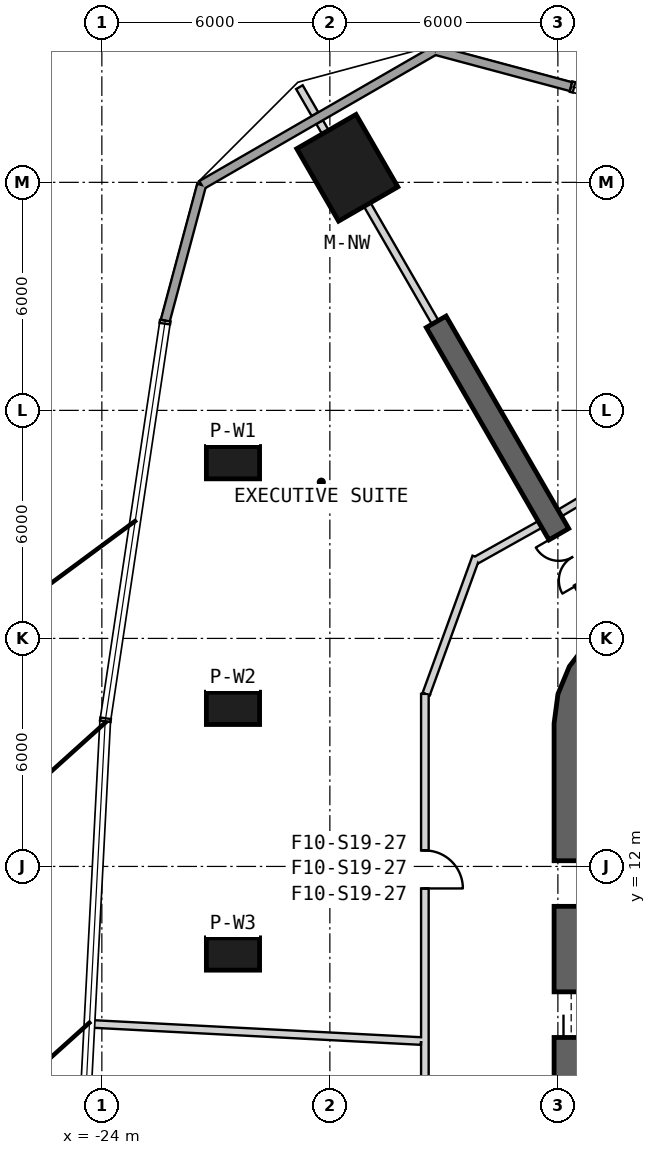
"""IFC4 building model, lengths in metres.
Left out: names, types, materials, properties, quantities, classifications, styles, units other than length and angle.
Written with IfcOpenShell. Run it as: python <this file> out.ifc"""

import sys

from ifc_helpers import new_model, si_unit, direction, frame, frame_2d, origin, origin_2d, place, context, subcontext, project, spatial, polyline, rectangle, outline, extrude, element, fill, save


model = new_model("IFC4")
c1 = context("Model", 3, precision=1e-05, world=origin(), true_north=direction((0.0, 1.0)))
c2 = subcontext(c1, "Body", "Model", "MODEL_VIEW")
j1 = project(units=[si_unit("LENGTHUNIT", "METRE"), si_unit("PLANEANGLEUNIT", "RADIAN")], contexts=[c1])
p1 = place(None, origin())
s1 = spatial("IfcSite", under=j1, at=p1, CompositionType="ELEMENT")
p2 = place(p1, origin())
s2 = spatial("IfcBuilding", under=s1, at=p2, CompositionType="ELEMENT")
p3 = place(p2, frame((0.0, 0.0, 310.4)))
s3 = spatial("IfcBuildingStorey", under=s2, at=p3, CompositionType="ELEMENT", Elevation=310.4)
p4 = place(p3, frame((-17.542, 30.383, 0.0), z_axis=(0.0, 0.0, 1.0), x_axis=(-0.5, 0.866025403784, 0.0)))
e1 = element("IfcColumn", 1, at=p4, inside=s3, PredefinedType="COLUMN", context=c2, shape_type="SweptSolid", body=[
    extrude(rectangle(XDim=2.2, YDim=1.8, at=origin_2d()), origin(), (0.0, 0.0, 1.0), 3.9),
])
for number, where, z_axis, x_axis in (
    (2, (-20.55, 22.624, 0.0), (0.0, 0.0, 1.0), (-1.0, 0.0, 0.0)),
    (3, (-20.55, 16.16, 0.0), (0.0, 0.0, 1.0), (-1.0, 0.0, 0.0)),
    (4, (-20.55, 9.696, 0.0), (0.0, 0.0, 1.0), (-1.0, 0.0, 0.0)),
):
    element("IfcColumn", number, at=place(p3, frame(where, z_axis=z_axis, x_axis=x_axis)), inside=s3, PredefinedType="COLUMN", context=c2, shape_type="SweptSolid", body=[
        extrude(rectangle(XDim=1.4, YDim=0.85, at=origin_2d()), origin(), (0.0, 0.0, 1.0), 3.9),
    ])
p5 = place(p3, frame((-11.65, 15.762, 0.0), z_axis=(0.0, 0.0, 1.0), x_axis=(0.0, -1.0, 0.0)))
e5 = element("IfcWall", 5, at=p5, inside=s3, PredefinedType="SHEAR", context=c2, shape_type="SweptSolid", body=[
    extrude(rectangle(XDim=31.523, YDim=0.9, at=frame_2d((15.762, 0.0))), origin(), (0.0, 0.0, 1.0), 3.9),
])
p6 = place(p5, frame((7.062, 0.0, 0.0)))
e6 = element("IfcOpeningElement", 6, at=p6, cuts=e5, PredefinedType="OPENING", context=c2, shape_type="SweptSolid", body=[
    extrude(rectangle(XDim=1.2, YDim=2.4, at=frame_2d((0.6, 1.2))), frame((0.0, 0.46, 0.0), z_axis=(0.0, -1.0, 0.0), x_axis=(1.0, 0.0, 0.0)), (0.0, 0.0, 1.0), 0.92),
])
p7 = place(p5, frame((9.762, 0.0, 0.0)))
e7 = element("IfcOpeningElement", 7, at=p7, cuts=e5, PredefinedType="OPENING", context=c2, shape_type="SweptSolid", body=[
    extrude(rectangle(XDim=1.2, YDim=2.4, at=frame_2d((0.6, 1.2))), frame((0.0, 0.46, 0.0), z_axis=(0.0, -1.0, 0.0), x_axis=(1.0, 0.0, 0.0)), (0.0, 0.0, 1.0), 0.92),
])
p8 = place(p5, frame((12.462, 0.0, 0.0)))
e8 = element("IfcOpeningElement", 8, at=p8, cuts=e5, PredefinedType="OPENING", context=c2, shape_type="SweptSolid", body=[
    extrude(rectangle(XDim=1.2, YDim=2.4, at=frame_2d((0.6, 1.2))), frame((0.0, 0.46, 0.0), z_axis=(0.0, -1.0, 0.0), x_axis=(1.0, 0.0, 0.0)), (0.0, 0.0, 1.0), 0.92),
])
p9 = place(p5, frame((15.162, 0.0, 0.0)))
e9 = element("IfcOpeningElement", 9, at=p9, cuts=e5, PredefinedType="OPENING", context=c2, shape_type="SweptSolid", body=[
    extrude(rectangle(XDim=1.2, YDim=2.4, at=frame_2d((0.6, 1.2))), frame((0.0, 0.46, 0.0), z_axis=(0.0, -1.0, 0.0), x_axis=(1.0, 0.0, 0.0)), (0.0, 0.0, 1.0), 0.92),
])
p10 = place(p5, frame((17.862, 0.0, 0.0)))
e10 = element("IfcOpeningElement", 10, at=p10, cuts=e5, PredefinedType="OPENING", context=c2, shape_type="SweptSolid", body=[
    extrude(rectangle(XDim=1.2, YDim=2.4, at=frame_2d((0.6, 1.2))), frame((0.0, 0.46, 0.0), z_axis=(0.0, -1.0, 0.0), x_axis=(1.0, 0.0, 0.0)), (0.0, 0.0, 1.0), 0.92),
])
p11 = place(p5, frame((20.562, 0.0, 0.0)))
e11 = element("IfcOpeningElement", 11, at=p11, cuts=e5, PredefinedType="OPENING", context=c2, shape_type="SweptSolid", body=[
    extrude(rectangle(XDim=1.2, YDim=2.4, at=frame_2d((0.6, 1.2))), frame((0.0, 0.46, 0.0), z_axis=(0.0, -1.0, 0.0), x_axis=(1.0, 0.0, 0.0)), (0.0, 0.0, 1.0), 0.92),
])
p12 = place(p5, frame((23.262, 0.0, 0.0)))
e12 = element("IfcOpeningElement", 12, at=p12, cuts=e5, PredefinedType="OPENING", context=c2, shape_type="SweptSolid", body=[
    extrude(rectangle(XDim=1.2, YDim=2.4, at=frame_2d((0.6, 1.2))), frame((0.0, 0.46, 0.0), z_axis=(0.0, -1.0, 0.0), x_axis=(1.0, 0.0, 0.0)), (0.0, 0.0, 1.0), 0.92),
])
p13 = place(p5, frame((3.612, 0.0, 0.0)))
e13 = element("IfcOpeningElement", 13, at=p13, cuts=e5, PredefinedType="OPENING", context=c2, shape_type="SweptSolid", body=[
    extrude(rectangle(XDim=1.2, YDim=2.4, at=frame_2d((0.6, 1.2))), frame((0.0, 0.46, 0.0), z_axis=(0.0, -1.0, 0.0), x_axis=(1.0, 0.0, 0.0)), (0.0, 0.0, 1.0), 0.92),
])
p14 = place(p5, frame((26.712, 0.0, 0.0)))
e14 = element("IfcOpeningElement", 14, at=p14, cuts=e5, PredefinedType="OPENING", context=c2, shape_type="SweptSolid", body=[
    extrude(rectangle(XDim=1.2, YDim=2.4, at=frame_2d((0.6, 1.2))), frame((0.0, 0.46, 0.0), z_axis=(0.0, -1.0, 0.0), x_axis=(1.0, 0.0, 0.0)), (0.0, 0.0, 1.0), 0.92),
])
p15 = place(p3, origin())
e15 = element("IfcWall", 15, at=p15, inside=s3, PredefinedType="SHEAR", context=c2, shape_type="SweptSolid", body=[
    extrude(outline(polyline([(-7.6, 18.36), (-8.323, 18.659), (-9.1, 18.762), (-9.876, 18.659), (-10.6, 18.36), (-11.221, 17.883), (-11.698, 17.262), (-11.998, 16.538), (-12.1, 15.762), (-11.2, 15.762), (-11.128, 16.305), (-10.919, 16.812), (-10.585, 17.247), (-10.15, 17.58), (-9.644, 17.79), (-9.1, 17.862), (-8.556, 17.79), (-8.05, 17.58), (-7.6, 18.36)])), origin(), (0.0, 0.0, 1.0), 3.9),
])
p16 = place(p3, frame((-10.575, 18.316, 0.0), z_axis=(0.0, 0.0, 1.0), x_axis=(-0.500009446655, 0.866019949687, 0.0)))
e16 = element("IfcWall", 16, at=p16, inside=s3, PredefinedType="SHEAR", context=c2, shape_type="SweptSolid", body=[
    extrude(rectangle(XDim=9.254, YDim=0.6, at=frame_2d((4.627, 0.0))), origin(), (0.0, 0.0, 1.0), 3.9),
])
p17 = place(p16, frame((1.4, 0.0, 0.0)))
e17 = element("IfcOpeningElement", 17, at=p17, cuts=e16, PredefinedType="OPENING", context=c2, shape_type="SweptSolid", body=[
    extrude(rectangle(XDim=1.4, YDim=2.4, at=frame_2d((0.7, 1.2))), frame((0.0, 0.31, 0.0), z_axis=(0.0, -1.0, 0.0), x_axis=(1.0, 0.0, 0.0)), (0.0, 0.0, 1.0), 0.62),
])
p18 = place(p3, frame((-11.654, 32.518, 0.0), z_axis=(0.0, 0.0, 1.0), x_axis=(-0.965928052649, 0.258810736071, 0.0)))
e18 = element("IfcWall", 18, at=p18, inside=s3, PredefinedType="SOLIDWALL", context=c2, shape_type="SweptSolid", body=[
    extrude(rectangle(XDim=3.705, YDim=0.24, at=frame_2d((1.853, 0.0))), origin(), (0.0, 0.0, 1.0), 3.6),
])
p19 = place(p3, frame((-15.233, 33.477, 0.0), z_axis=(0.0, 0.0, 1.0), x_axis=(-0.866031377081, -0.499989653803, 0.0)))
e19 = element("IfcWall", 19, at=p19, inside=s3, PredefinedType="SOLIDWALL", context=c2, shape_type="SweptSolid", body=[
    extrude(rectangle(XDim=7.092, YDim=0.24, at=frame_2d((3.546, 0.0))), origin(), (0.0, 0.0, 1.0), 3.6),
])
p20 = place(p3, frame((-21.375, 29.931, 0.0), z_axis=(0.0, 0.0, 1.0), x_axis=(-0.258772400119, -0.965938323568, 0.0)))
e20 = element("IfcWall", 20, at=p20, inside=s3, PredefinedType="SOLIDWALL", context=c2, shape_type="SweptSolid", body=[
    extrude(rectangle(XDim=3.697, YDim=0.24, at=frame_2d((1.848, 0.0))), origin(), (0.0, 0.0, 1.0), 3.6),
])
p21 = place(p3, frame((-15.5, 16.541, 0.0), z_axis=(0.0, 0.0, 1.0), x_axis=(0.0, -1.0, 0.0)))
e21 = element("IfcWall", 21, at=p21, inside=s3, PredefinedType="PARTITIONING", context=c2, shape_type="SweptSolid", body=[
    extrude(rectangle(XDim=9.163, YDim=0.2, at=frame_2d((4.581, 0.0))), origin(), (0.0, 0.0, 1.0), 2.88),
])
p22 = place(p21, frame((4.12, 0.0, 0.0)))
e22 = element("IfcOpeningElement", 22, at=p22, cuts=e21, PredefinedType="OPENING", context=c2, shape_type="SweptSolid", body=[
    extrude(rectangle(XDim=1.0, YDim=2.1, at=frame_2d((0.5, 1.05))), frame((0.0, 0.11, 0.0), z_axis=(0.0, -1.0, 0.0), x_axis=(1.0, 0.0, 0.0)), (0.0, 0.0, 1.0), 0.22),
])
p23 = place(p3, frame((-15.5, 7.378, 0.0), z_axis=(0.0, 0.0, 1.0), x_axis=(0.0, -1.0, 0.0)))
e23 = element("IfcWall", 23, at=p23, inside=s3, PredefinedType="PARTITIONING", context=c2, shape_type="SweptSolid", body=[
    extrude(rectangle(XDim=7.308, YDim=0.2, at=frame_2d((3.654, 0.0))), origin(), (0.0, 0.0, 1.0), 2.97),
])
p24 = place(p3, frame((-14.152, 20.143, 0.0), z_axis=(0.0, 0.0, 1.0), x_axis=(-0.342008467257, -0.939696870445, 0.0)))
e24 = element("IfcWall", 24, at=p24, inside=s3, PredefinedType="PARTITIONING", context=c2, shape_type="SweptSolid", body=[
    extrude(rectangle(XDim=3.841, YDim=0.2, at=frame_2d((1.92, 0.0))), origin(), (0.0, 0.0, 1.0), 2.88),
])
p25 = place(p3, frame((-12.47, 20.999, 0.0), z_axis=(0.0, 0.0, 1.0), x_axis=(-0.872542788959, -0.488537697046, 0.0)))
e25 = element("IfcWall", 25, at=p25, inside=s3, PredefinedType="PARTITIONING", context=c2, shape_type="SweptSolid", body=[
    extrude(rectangle(XDim=1.925, YDim=0.2, at=frame_2d((0.962, 0.0))), origin(), (0.0, 0.0, 1.0), 3.6),
])
p26 = place(p3, frame((-10.155, 22.367, 0.0), z_axis=(0.0, 0.0, 1.0), x_axis=(-0.859343009577, -0.511399640097, 0.0)))
e26 = element("IfcWall", 26, at=p26, inside=s3, PredefinedType="PARTITIONING", context=c2, shape_type="SweptSolid", body=[
    extrude(rectangle(XDim=2.09, YDim=0.2, at=frame_2d((1.045, 0.0))), origin(), (0.0, 0.0, 1.0), 3.6),
])
p27 = place(p3, frame((-24.326, 7.86, 0.0), z_axis=(0.0, 0.0, 1.0), x_axis=(0.998647308215, -0.051995709386, 0.0)))
e27 = element("IfcWall", 27, at=p27, inside=s3, PredefinedType="PARTITIONING", context=c2, shape_type="SweptSolid", body=[
    extrude(rectangle(XDim=8.738, YDim=0.2, at=frame_2d((4.369, 0.0))), origin(), (0.0, 0.0, 1.0), 2.97),
])
p28 = place(p3, frame((-18.801, 32.505, 0.0), z_axis=(0.0, 0.0, 1.0), x_axis=(0.499970888758, -0.866042210515, 0.0)))
e28 = element("IfcWall", 28, at=p28, inside=s3, PredefinedType="PARTITIONING", context=c2, shape_type="SweptSolid", body=[
    extrude(rectangle(XDim=0.822, YDim=0.2, at=frame_2d((0.411, 0.0))), origin(), (0.0, 0.0, 1.0), 3.6),
])
p29 = place(p3, frame((-18.27, 31.585, 0.0), z_axis=(0.0, 0.0, 1.0), x_axis=(0.500091252813, -0.865972712538, 0.0)))
e29 = element("IfcWall", 29, at=p29, inside=s3, PredefinedType="PARTITIONING", context=c2, shape_type="SweptSolid", body=[
    extrude(rectangle(XDim=0.306, YDim=0.2, at=frame_2d((0.153, 0.0))), origin(), (0.0, 0.0, 1.0), 3.6),
])
p30 = place(p3, frame((-17.017, 29.415, 0.0), z_axis=(0.0, 0.0, 1.0), x_axis=(0.49999800388, -0.866026556242, 0.0)))
e30 = element("IfcWall", 30, at=p30, inside=s3, PredefinedType="PARTITIONING", context=c2, shape_type="SweptSolid", body=[
    extrude(rectangle(XDim=3.579, YDim=0.2, at=frame_2d((1.79, 0.0))), origin(), (0.0, 0.0, 1.0), 3.17),
])
p31 = place(p22, origin())
e31 = element("IfcDoor", 31, at=p31, inside=s3, OperationType="SINGLE_SWING_LEFT", PredefinedType="USERDEFINED", context=c2, shape_type="SweptSolid", body=[
    extrude(rectangle(XDim=1.0, YDim=2.1, at=frame_2d((0.5, 1.05))), frame((0.0, 0.025, 0.0), z_axis=(0.0, -1.0, 0.0), x_axis=(1.0, 0.0, 0.0)), (0.0, 0.0, 1.0), 0.05),
])
fill(e22, e31)
p32 = place(p6, origin())
e32 = element("IfcDoor", 32, at=p32, inside=s3, OperationType="SLIDING_TO_LEFT", PredefinedType="USERDEFINED", context=c2, shape_type="SweptSolid", body=[
    extrude(rectangle(XDim=1.2, YDim=2.4, at=frame_2d((0.6, 1.2))), frame((0.0, 0.025, 0.0), z_axis=(0.0, -1.0, 0.0), x_axis=(1.0, 0.0, 0.0)), (0.0, 0.0, 1.0), 0.05),
])
fill(e6, e32)
p33 = place(p13, origin())
e33 = element("IfcDoor", 33, at=p33, inside=s3, OperationType="SINGLE_SWING_LEFT", PredefinedType="USERDEFINED", context=c2, shape_type="SweptSolid", body=[
    extrude(rectangle(XDim=1.2, YDim=2.4, at=frame_2d((0.6, 1.2))), frame((0.0, 0.025, 0.0), z_axis=(0.0, -1.0, 0.0), x_axis=(1.0, 0.0, 0.0)), (0.0, 0.0, 1.0), 0.05),
])
fill(e13, e33)
p34 = place(p17, origin())
e34 = element("IfcDoor", 34, at=p34, inside=s3, OperationType="DOUBLE_DOOR_SINGLE_SWING", PredefinedType="NOTDEFINED", context=c2, shape_type="SweptSolid", body=[
    extrude(rectangle(XDim=1.4, YDim=2.4, at=frame_2d((0.7, 1.2))), frame((0.0, 0.025, 0.0), z_axis=(0.0, -1.0, 0.0), x_axis=(1.0, 0.0, 0.0)), (0.0, 0.0, 1.0), 0.05),
])
fill(e17, e34)
save(model, sys.argv[1])
